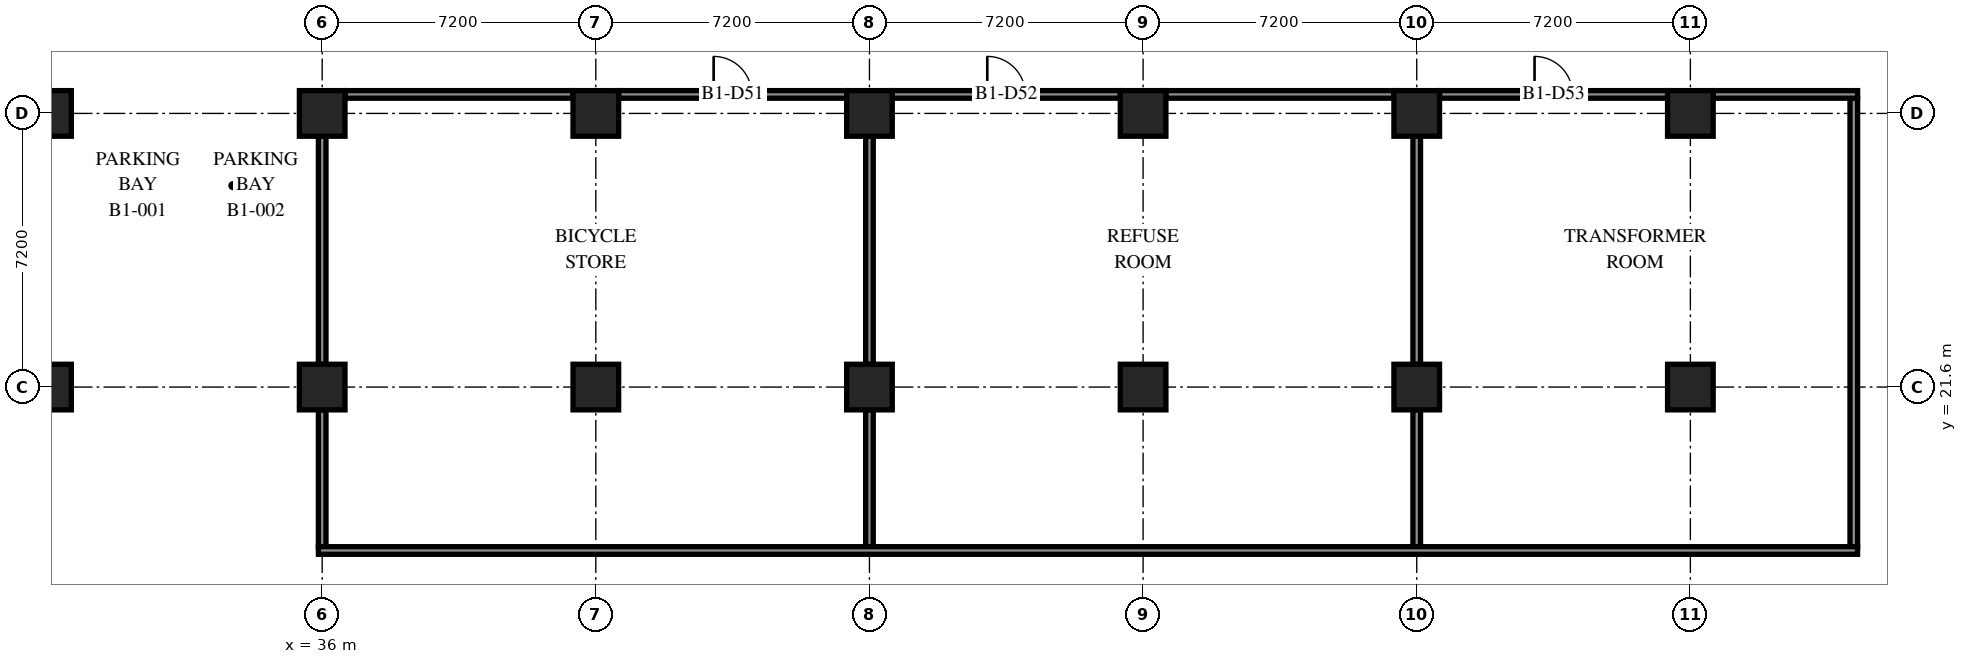
"""IFC4 building model, lengths in metres.
Left out: names, types, materials, properties, quantities, classifications, styles, units other than length and angle.
Written with IfcOpenShell. Run it as: python <this file> out.ifc"""

import sys

from ifc_helpers import new_model, si_unit, direction, frame, frame_2d, origin, origin_2d, place, context, subcontext, project, spatial, rectangle, extrude, element, fill, save


model = new_model("IFC4")
c1 = context("Model", 3, precision=1e-05, world=origin(), true_north=direction((0.0, 1.0)))
c2 = subcontext(c1, "Body", "Model", "MODEL_VIEW")
j1 = project(units=[si_unit("LENGTHUNIT", "METRE"), si_unit("PLANEANGLEUNIT", "RADIAN")], contexts=[c1])
p1 = place(None, origin())
s1 = spatial("IfcSite", under=j1, at=p1, CompositionType="ELEMENT")
p2 = place(p1, origin())
s2 = spatial("IfcBuilding", under=s1, at=p2, CompositionType="ELEMENT")
p3 = place(p2, frame((0.0, 0.0, -4.5)))
s3 = spatial("IfcBuildingStorey", under=s2, at=p3, CompositionType="ELEMENT", Elevation=-4.5)
for number, where, z_axis, x_axis in (
    (1, (28.8, 21.6, 0.0), (0.0, 0.0, 1.0), (1.0, 0.0, 0.0)),
    (2, (28.8, 28.8, 0.0), (0.0, 0.0, 1.0), (1.0, 0.0, 0.0)),
    (3, (36.0, 21.6, 0.0), (0.0, 0.0, 1.0), (1.0, 0.0, 0.0)),
    (4, (36.0, 28.8, 0.0), (0.0, 0.0, 1.0), (1.0, 0.0, 0.0)),
    (5, (43.2, 21.6, 0.0), (0.0, 0.0, 1.0), (1.0, 0.0, 0.0)),
    (6, (43.2, 28.8, 0.0), (0.0, 0.0, 1.0), (1.0, 0.0, 0.0)),
    (7, (50.4, 21.6, 0.0), (0.0, 0.0, 1.0), (1.0, 0.0, 0.0)),
    (8, (50.4, 28.8, 0.0), (0.0, 0.0, 1.0), (1.0, 0.0, 0.0)),
    (9, (57.6, 21.6, 0.0), (0.0, 0.0, 1.0), (1.0, 0.0, 0.0)),
    (10, (57.6, 28.8, 0.0), (0.0, 0.0, 1.0), (1.0, 0.0, 0.0)),
    (11, (64.8, 21.6, 0.0), (0.0, 0.0, 1.0), (1.0, 0.0, 0.0)),
    (12, (64.8, 28.8, 0.0), (0.0, 0.0, 1.0), (1.0, 0.0, 0.0)),
    (13, (72.0, 21.6, 0.0), (0.0, 0.0, 1.0), (1.0, 0.0, 0.0)),
    (14, (72.0, 28.8, 0.0), (0.0, 0.0, 1.0), (1.0, 0.0, 0.0)),
):
    element("IfcColumn", number, at=place(p3, frame(where, z_axis=z_axis, x_axis=x_axis)), inside=s3, PredefinedType="COLUMN", context=c2, shape_type="SweptSolid", body=[
        extrude(rectangle(XDim=1.2, YDim=1.2, at=origin_2d()), origin(), (0.0, 0.0, 1.0), 4.1),
    ])
p4 = place(p3, frame((36.0, 17.4, 0.0), z_axis=(0.0, 0.0, 1.0), x_axis=(0.0, 1.0, 0.0)))
e15 = element("IfcWall", 15, at=p4, inside=s3, PredefinedType="PARTITIONING", context=c2, shape_type="SweptSolid", body=[
    extrude(rectangle(XDim=3.6, YDim=0.2, at=frame_2d((1.8, 0.0))), origin(), (0.0, 0.0, 1.0), 4.1),
])
p5 = place(p3, frame((36.0, 22.2, 0.0), z_axis=(0.0, 0.0, 1.0), x_axis=(0.0, 1.0, 0.0)))
e16 = element("IfcWall", 16, at=p5, inside=s3, PredefinedType="PARTITIONING", context=c2, shape_type="SweptSolid", body=[
    extrude(rectangle(XDim=6.0, YDim=0.2, at=frame_2d((3.0, 0.0))), origin(), (0.0, 0.0, 1.0), 4.1),
])
p6 = place(p3, frame((50.4, 17.4, 0.0), z_axis=(0.0, 0.0, 1.0), x_axis=(0.0, 1.0, 0.0)))
e17 = element("IfcWall", 17, at=p6, inside=s3, PredefinedType="PARTITIONING", context=c2, shape_type="SweptSolid", body=[
    extrude(rectangle(XDim=3.6, YDim=0.2, at=frame_2d((1.8, 0.0))), origin(), (0.0, 0.0, 1.0), 4.1),
])
p7 = place(p3, frame((50.4, 22.2, 0.0), z_axis=(0.0, 0.0, 1.0), x_axis=(0.0, 1.0, 0.0)))
e18 = element("IfcWall", 18, at=p7, inside=s3, PredefinedType="PARTITIONING", context=c2, shape_type="SweptSolid", body=[
    extrude(rectangle(XDim=6.0, YDim=0.2, at=frame_2d((3.0, 0.0))), origin(), (0.0, 0.0, 1.0), 4.1),
])
p8 = place(p3, frame((64.8, 17.4, 0.0), z_axis=(0.0, 0.0, 1.0), x_axis=(0.0, 1.0, 0.0)))
e19 = element("IfcWall", 19, at=p8, inside=s3, PredefinedType="PARTITIONING", context=c2, shape_type="SweptSolid", body=[
    extrude(rectangle(XDim=3.6, YDim=0.2, at=frame_2d((1.8, 0.0))), origin(), (0.0, 0.0, 1.0), 4.1),
])
p9 = place(p3, frame((64.8, 22.2, 0.0), z_axis=(0.0, 0.0, 1.0), x_axis=(0.0, 1.0, 0.0)))
e20 = element("IfcWall", 20, at=p9, inside=s3, PredefinedType="PARTITIONING", context=c2, shape_type="SweptSolid", body=[
    extrude(rectangle(XDim=6.0, YDim=0.2, at=frame_2d((3.0, 0.0))), origin(), (0.0, 0.0, 1.0), 4.1),
])
p10 = place(p3, frame((76.3, 17.4, 0.0), z_axis=(0.0, 0.0, 1.0), x_axis=(0.0, 1.0, 0.0)))
e21 = element("IfcWall", 21, at=p10, inside=s3, PredefinedType="PARTITIONING", context=c2, shape_type="SweptSolid", body=[
    extrude(rectangle(XDim=11.8, YDim=0.2, at=frame_2d((5.9, 0.0))), origin(), (0.0, 0.0, 1.0), 4.1),
])
p11 = place(p3, frame((35.9, 17.3, 0.0), z_axis=(0.0, 0.0, 1.0), x_axis=(1.0, 0.0, 0.0)))
e22 = element("IfcWall", 22, at=p11, inside=s3, PredefinedType="PARTITIONING", context=c2, shape_type="SweptSolid", body=[
    extrude(rectangle(XDim=40.5, YDim=0.2, at=frame_2d((20.25, 0.0))), origin(), (0.0, 0.0, 1.0), 4.1),
])
p12 = place(p3, frame((36.6, 29.3, 0.0), z_axis=(0.0, 0.0, 1.0), x_axis=(1.0, 0.0, 0.0)))
e23 = element("IfcWall", 23, at=p12, inside=s3, PredefinedType="PARTITIONING", context=c2, shape_type="SweptSolid", body=[
    extrude(rectangle(XDim=6.0, YDim=0.2, at=frame_2d((3.0, 0.0))), origin(), (0.0, 0.0, 1.0), 4.1),
])
p13 = place(p3, frame((43.8, 29.3, 0.0), z_axis=(0.0, 0.0, 1.0), x_axis=(1.0, 0.0, 0.0)))
e24 = element("IfcWall", 24, at=p13, inside=s3, PredefinedType="PARTITIONING", context=c2, shape_type="SweptSolid", body=[
    extrude(rectangle(XDim=6.0, YDim=0.2, at=frame_2d((3.0, 0.0))), origin(), (0.0, 0.0, 1.0), 4.1),
])
p14 = place(p13, frame((2.5, 0.0, 0.0)))
e25 = element("IfcOpeningElement", 25, at=p14, cuts=e24, PredefinedType="OPENING", context=c2, shape_type="SweptSolid", body=[
    extrude(rectangle(XDim=1.0, YDim=2.1, at=frame_2d((0.5, 1.05))), frame((0.0, 0.11, 0.0), z_axis=(0.0, -1.0, 0.0), x_axis=(1.0, 0.0, 0.0)), (0.0, 0.0, 1.0), 0.22),
])
p15 = place(p3, frame((51.0, 29.3, 0.0), z_axis=(0.0, 0.0, 1.0), x_axis=(1.0, 0.0, 0.0)))
e26 = element("IfcWall", 26, at=p15, inside=s3, PredefinedType="PARTITIONING", context=c2, shape_type="SweptSolid", body=[
    extrude(rectangle(XDim=6.0, YDim=0.2, at=frame_2d((3.0, 0.0))), origin(), (0.0, 0.0, 1.0), 4.1),
])
p16 = place(p15, frame((2.5, 0.0, 0.0)))
e27 = element("IfcOpeningElement", 27, at=p16, cuts=e26, PredefinedType="OPENING", context=c2, shape_type="SweptSolid", body=[
    extrude(rectangle(XDim=1.0, YDim=2.1, at=frame_2d((0.5, 1.05))), frame((0.0, 0.11, 0.0), z_axis=(0.0, -1.0, 0.0), x_axis=(1.0, 0.0, 0.0)), (0.0, 0.0, 1.0), 0.22),
])
p17 = place(p3, frame((58.2, 29.3, 0.0), z_axis=(0.0, 0.0, 1.0), x_axis=(1.0, 0.0, 0.0)))
e28 = element("IfcWall", 28, at=p17, inside=s3, PredefinedType="PARTITIONING", context=c2, shape_type="SweptSolid", body=[
    extrude(rectangle(XDim=6.0, YDim=0.2, at=frame_2d((3.0, 0.0))), origin(), (0.0, 0.0, 1.0), 4.1),
])
p18 = place(p3, frame((65.4, 29.3, 0.0), z_axis=(0.0, 0.0, 1.0), x_axis=(1.0, 0.0, 0.0)))
e29 = element("IfcWall", 29, at=p18, inside=s3, PredefinedType="PARTITIONING", context=c2, shape_type="SweptSolid", body=[
    extrude(rectangle(XDim=6.0, YDim=0.2, at=frame_2d((3.0, 0.0))), origin(), (0.0, 0.0, 1.0), 4.1),
])
p19 = place(p18, frame((2.5, 0.0, 0.0)))
e30 = element("IfcOpeningElement", 30, at=p19, cuts=e29, PredefinedType="OPENING", context=c2, shape_type="SweptSolid", body=[
    extrude(rectangle(XDim=1.0, YDim=2.1, at=frame_2d((0.5, 1.05))), frame((0.0, 0.11, 0.0), z_axis=(0.0, -1.0, 0.0), x_axis=(1.0, 0.0, 0.0)), (0.0, 0.0, 1.0), 0.22),
])
p20 = place(p3, frame((72.6, 29.3, 0.0), z_axis=(0.0, 0.0, 1.0), x_axis=(1.0, 0.0, 0.0)))
e31 = element("IfcWall", 31, at=p20, inside=s3, PredefinedType="PARTITIONING", context=c2, shape_type="SweptSolid", body=[
    extrude(rectangle(XDim=3.8, YDim=0.2, at=frame_2d((1.9, 0.0))), origin(), (0.0, 0.0, 1.0), 4.1),
])
p21 = place(p14, origin())
e32 = element("IfcDoor", 32, at=p21, inside=s3, OperationType="SINGLE_SWING_RIGHT", PredefinedType="DOOR", context=c2, shape_type="SweptSolid", body=[
    extrude(rectangle(XDim=1.0, YDim=2.1, at=frame_2d((0.5, 1.05))), frame((0.0, 0.025, 0.0), z_axis=(0.0, -1.0, 0.0), x_axis=(1.0, 0.0, 0.0)), (0.0, 0.0, 1.0), 0.05),
])
fill(e25, e32)
p22 = place(p16, origin())
e33 = element("IfcDoor", 33, at=p22, inside=s3, OperationType="SINGLE_SWING_LEFT", PredefinedType="DOOR", context=c2, shape_type="SweptSolid", body=[
    extrude(rectangle(XDim=1.0, YDim=2.1, at=frame_2d((0.5, 1.05))), frame((0.0, 0.025, 0.0), z_axis=(0.0, -1.0, 0.0), x_axis=(1.0, 0.0, 0.0)), (0.0, 0.0, 1.0), 0.05),
])
fill(e27, e33)
p23 = place(p19, origin())
e34 = element("IfcDoor", 34, at=p23, inside=s3, OperationType="SINGLE_SWING_RIGHT", PredefinedType="DOOR", context=c2, shape_type="SweptSolid", body=[
    extrude(rectangle(XDim=1.0, YDim=2.1, at=frame_2d((0.5, 1.05))), frame((0.0, 0.025, 0.0), z_axis=(0.0, -1.0, 0.0), x_axis=(1.0, 0.0, 0.0)), (0.0, 0.0, 1.0), 0.05),
])
fill(e30, e34)
save(model, sys.argv[1])
